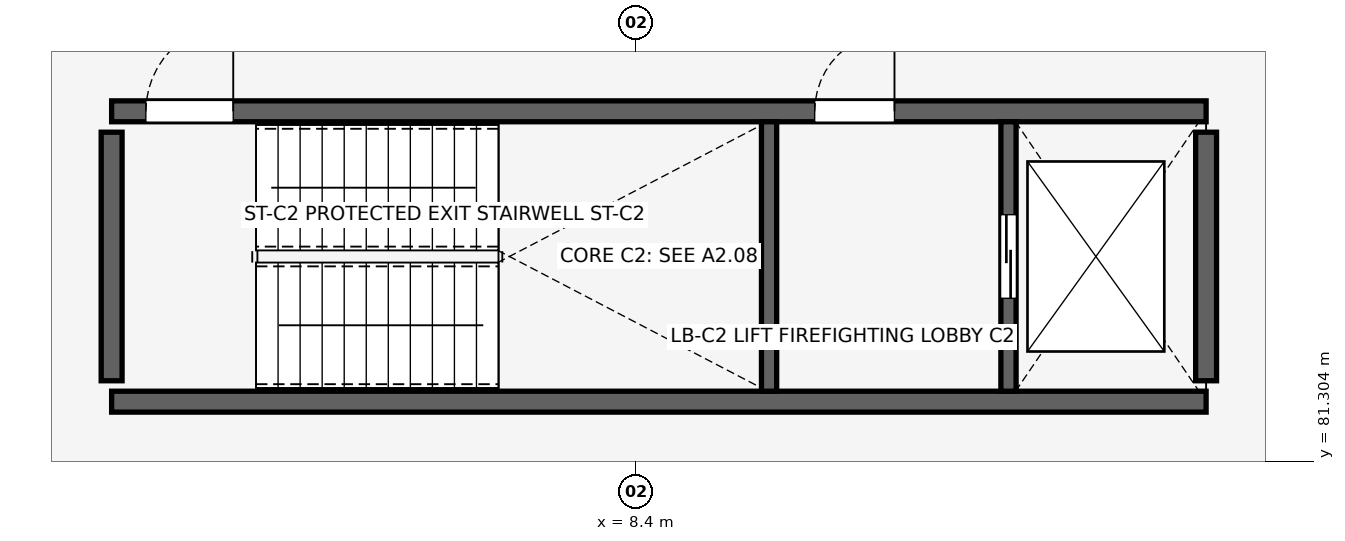
"""IFC4 building model, lengths in metres.
Left out: names, types, materials, properties, quantities, classifications, styles, units other than length and angle.
Written with IfcOpenShell. Run it as: python <this file> out.ifc"""

import sys

from ifc_helpers import new_model, si_unit, direction, frame, frame_2d, origin, place, context, subcontext, project, spatial, rectangle, extrude, element, fill, save


model = new_model("IFC4")
c1 = context("Model", 3, precision=1e-05, world=origin(), true_north=direction((0.0, 1.0)))
c2 = subcontext(c1, "Body", "Model", "MODEL_VIEW")
j1 = project(units=[si_unit("LENGTHUNIT", "METRE"), si_unit("PLANEANGLEUNIT", "RADIAN")], contexts=[c1])
p1 = place(None, origin())
s1 = spatial("IfcSite", under=j1, at=p1, CompositionType="ELEMENT")
p2 = place(p1, origin())
s2 = spatial("IfcBuilding", under=s1, at=p2, CompositionType="ELEMENT")
p3 = place(p2, frame((0.0, 0.0, 17.2)))
s3 = spatial("IfcBuildingStorey", under=s2, at=p3, CompositionType="ELEMENT", Elevation=17.2)
p4 = place(p3, frame((1.5, 82.09, 0.0), z_axis=(0.0, 0.0, 1.0), x_axis=(1.0, 0.0, 0.0)))
e1 = element("IfcWall", 1, at=p4, inside=s3, PredefinedType="SHEAR", context=c2, shape_type="SweptSolid", body=[
    extrude(rectangle(XDim=14.4, YDim=0.275, at=frame_2d((7.2, 0.0))), origin(), (0.0, 0.0, 1.0), 3.59),
])
p5 = place(p3, frame((1.5, 85.91, 0.0), z_axis=(0.0, 0.0, 1.0), x_axis=(1.0, 0.0, 0.0)))
e2 = element("IfcWall", 2, at=p5, inside=s3, PredefinedType="SHEAR", context=c2, shape_type="SweptSolid", body=[
    extrude(rectangle(XDim=14.4, YDim=0.275, at=frame_2d((7.2, 0.0))), origin(), (0.0, 0.0, 1.0), 3.59),
])
p6 = place(p5, frame((0.45, 0.0, 0.0), z_axis=(0.0, 0.0, 1.0), x_axis=(1.0, 0.0, 0.0)))
e3 = element("IfcOpeningElement", 3, at=p6, cuts=e2, PredefinedType="OPENING", context=c2, shape_type="SweptSolid", body=[
    extrude(rectangle(XDim=1.15, YDim=2.15, at=frame_2d((0.575, 1.075))), frame((0.0, 0.147, 0.0), z_axis=(0.0, -1.0, 0.0), x_axis=(1.0, 0.0, 0.0)), (0.0, 0.0, 1.0), 0.295),
])
p7 = place(p5, frame((9.25, 0.0, 0.0), z_axis=(0.0, 0.0, 1.0), x_axis=(1.0, 0.0, 0.0)))
e4 = element("IfcOpeningElement", 4, at=p7, cuts=e2, PredefinedType="OPENING", context=c2, shape_type="SweptSolid", body=[
    extrude(rectangle(XDim=1.05, YDim=2.15, at=frame_2d((0.525, 1.075))), frame((0.0, 0.147, 0.0), z_axis=(0.0, -1.0, 0.0), x_axis=(1.0, 0.0, 0.0)), (0.0, 0.0, 1.0), 0.295),
])
for number, where, z_axis, x_axis in (
    (5, (1.5, 82.365, 0.0), (0.0, 0.0, 1.0), (0.0, 1.0, 0.0)),
    (6, (15.9, 82.365, 0.0), (0.0, 0.0, 1.0), (0.0, 1.0, 0.0)),
):
    element("IfcWall", number, at=place(p3, frame(where, z_axis=z_axis, x_axis=x_axis)), inside=s3, PredefinedType="SHEAR", context=c2, shape_type="SweptSolid", body=[
        extrude(rectangle(XDim=3.27, YDim=0.275, at=frame_2d((1.635, 0.0))), origin(), (0.0, 0.0, 1.0), 3.59),
    ])
p8 = place(p3, frame((10.15, 82.228, 0.0), z_axis=(0.0, 0.0, 1.0), x_axis=(0.0, 1.0, 0.0)))
e7 = element("IfcWall", 7, at=p8, inside=s3, PredefinedType="SHEAR", context=c2, shape_type="SweptSolid", body=[
    extrude(rectangle(XDim=3.545, YDim=0.2, at=frame_2d((1.772, 0.0))), origin(), (0.0, 0.0, 1.0), 3.59),
])
p9 = place(p3, frame((13.3, 82.228, 0.0), z_axis=(0.0, 0.0, 1.0), x_axis=(0.0, 1.0, 0.0)))
e8 = element("IfcWall", 8, at=p9, inside=s3, PredefinedType="SHEAR", context=c2, shape_type="SweptSolid", body=[
    extrude(rectangle(XDim=3.545, YDim=0.2, at=frame_2d((1.772, 0.0))), origin(), (0.0, 0.0, 1.0), 3.59),
])
p10 = place(p9, frame((1.222, 0.0, 0.0), z_axis=(0.0, 0.0, 1.0), x_axis=(1.0, 0.0, 0.0)))
e9 = element("IfcOpeningElement", 9, at=p10, cuts=e8, PredefinedType="OPENING", context=c2, shape_type="SweptSolid", body=[
    extrude(rectangle(XDim=1.1, YDim=2.15, at=frame_2d((0.55, 1.075))), frame((0.0, 0.11, 0.0), z_axis=(0.0, -1.0, 0.0), x_axis=(1.0, 0.0, 0.0)), (0.0, 0.0, 1.0), 0.22),
])
p11 = place(p6, origin())
e10 = element("IfcDoor", 10, at=p11, inside=s3, OperationType="SINGLE_SWING_RIGHT", PredefinedType="DOOR", context=c2, shape_type="SweptSolid", body=[
    extrude(rectangle(XDim=1.15, YDim=2.15, at=frame_2d((0.575, 1.075))), frame((0.0, 0.025, 0.0), z_axis=(0.0, -1.0, 0.0), x_axis=(1.0, 0.0, 0.0)), (0.0, 0.0, 1.0), 0.05),
])
fill(e3, e10)
p12 = place(p7, origin())
e11 = element("IfcDoor", 11, at=p12, inside=s3, OperationType="SINGLE_SWING_RIGHT", PredefinedType="DOOR", context=c2, shape_type="SweptSolid", body=[
    extrude(rectangle(XDim=1.05, YDim=2.15, at=frame_2d((0.525, 1.075))), frame((0.0, 0.025, 0.0), z_axis=(0.0, -1.0, 0.0), x_axis=(1.0, 0.0, 0.0)), (0.0, 0.0, 1.0), 0.05),
])
fill(e4, e11)
p13 = place(p10, origin())
e12 = element("IfcDoor", 12, at=p13, inside=s3, OperationType="DOUBLE_DOOR_SLIDING", PredefinedType="DOOR", context=c2, shape_type="SweptSolid", body=[
    extrude(rectangle(XDim=1.1, YDim=2.15, at=frame_2d((0.55, 1.075))), frame((0.0, 0.025, 0.0), z_axis=(0.0, -1.0, 0.0), x_axis=(1.0, 0.0, 0.0)), (0.0, 0.0, 1.0), 0.05),
])
fill(e9, e12)
save(model, sys.argv[1])
